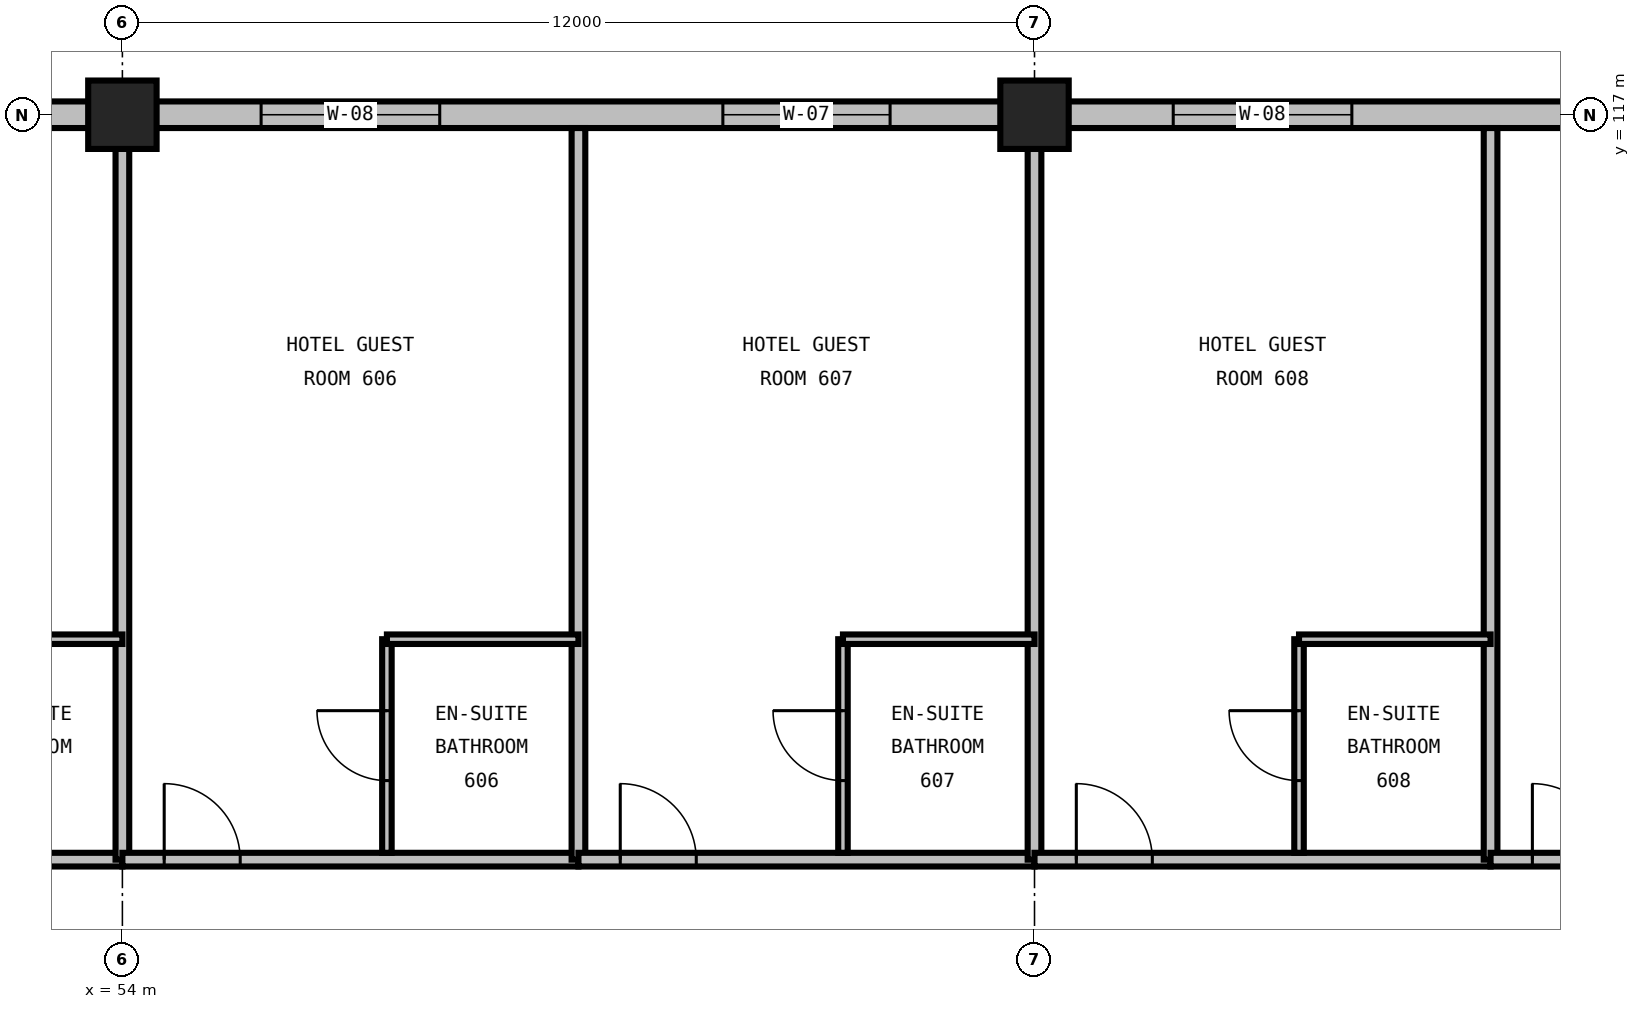
"""IFC4 building model, lengths in metres.
Left out: names, types, materials, properties, quantities, classifications, styles, units other than length and angle.
Written with IfcOpenShell. Run it as: python <this file> out.ifc"""

import sys

from ifc_helpers import new_model, si_unit, direction, frame, frame_2d, origin, origin_2d, place, context, subcontext, project, spatial, rectangle, extrude, element, fill, save


model = new_model("IFC4")
c1 = context("Model", 3, precision=1e-05, world=origin(), true_north=direction((0.0, 1.0)))
c2 = subcontext(c1, "Body", "Model", "MODEL_VIEW")
j1 = project(units=[si_unit("LENGTHUNIT", "METRE"), si_unit("PLANEANGLEUNIT", "RADIAN")], contexts=[c1])
p1 = place(None, origin())
s1 = spatial("IfcSite", under=j1, at=p1, CompositionType="ELEMENT")
p2 = place(p1, origin())
s2 = spatial("IfcBuilding", under=s1, at=p2, CompositionType="ELEMENT")
p3 = place(p2, frame((0.0, 0.0, 31.2)))
s3 = spatial("IfcBuildingStorey", under=s2, at=p3, CompositionType="ELEMENT", Elevation=31.2)
for number, where, z_axis, x_axis in (
    (1, (54.0, 117.0, 0.0), (0.0, 0.0, 1.0), (1.0, 0.0, 0.0)),
    (2, (66.0, 117.0, 0.0), (0.0, 0.0, 1.0), (1.0, 0.0, 0.0)),
):
    element("IfcColumn", number, at=place(p3, frame(where, z_axis=z_axis, x_axis=x_axis)), inside=s3, PredefinedType="COLUMN", context=c2, shape_type="SweptSolid", body=[
        extrude(rectangle(XDim=0.9, YDim=0.9, at=origin_2d()), origin(), (0.0, 0.0, 1.0), 3.6),
    ])
p4 = place(p3, frame((54.0, 117.0, 0.0), z_axis=(0.0, 0.0, 1.0), x_axis=(-1.0, 0.0, 0.0)))
e3 = element("IfcWall", 3, at=p4, inside=s3, PredefinedType="STANDARD", context=c2, shape_type="SweptSolid", body=[
    extrude(rectangle(XDim=12.0, YDim=0.35, at=frame_2d((6.0, 0.0))), origin(), (0.0, 0.0, 1.0), 2.486),
])
p5 = place(p4, frame((1.9, 0.0, 0.75)))
e4 = element("IfcOpeningElement", 4, at=p5, cuts=e3, PredefinedType="OPENING", context=c2, shape_type="SweptSolid", body=[
    extrude(rectangle(XDim=2.2, YDim=1.6, at=frame_2d((1.1, 0.8))), frame((0.0, 0.19, 0.0), z_axis=(0.0, -1.0, 0.0), x_axis=(1.0, 0.0, 0.0)), (0.0, 0.0, 1.0), 0.38),
])
p6 = place(p4, frame((7.825, 0.0, 0.75)))
e5 = element("IfcOpeningElement", 5, at=p6, cuts=e3, PredefinedType="OPENING", context=c2, shape_type="SweptSolid", body=[
    extrude(rectangle(XDim=2.35, YDim=1.6, at=frame_2d((1.175, 0.8))), frame((0.0, 0.19, 0.0), z_axis=(0.0, -1.0, 0.0), x_axis=(1.0, 0.0, 0.0)), (0.0, 0.0, 1.0), 0.38),
])
p7 = place(p3, frame((66.0, 117.0, 0.0), z_axis=(0.0, 0.0, 1.0), x_axis=(-1.0, 0.0, 0.0)))
e6 = element("IfcWall", 6, at=p7, inside=s3, PredefinedType="STANDARD", context=c2, shape_type="SweptSolid", body=[
    extrude(rectangle(XDim=12.0, YDim=0.35, at=frame_2d((6.0, 0.0))), origin(), (0.0, 0.0, 1.0), 2.486),
])
p8 = place(p7, frame((1.9, 0.0, 0.75)))
e7 = element("IfcOpeningElement", 7, at=p8, cuts=e6, PredefinedType="OPENING", context=c2, shape_type="SweptSolid", body=[
    extrude(rectangle(XDim=2.2, YDim=1.6, at=frame_2d((1.1, 0.8))), frame((0.0, 0.19, 0.0), z_axis=(0.0, -1.0, 0.0), x_axis=(1.0, 0.0, 0.0)), (0.0, 0.0, 1.0), 0.38),
])
p9 = place(p7, frame((7.825, 0.0, 0.75)))
e8 = element("IfcOpeningElement", 8, at=p9, cuts=e6, PredefinedType="OPENING", context=c2, shape_type="SweptSolid", body=[
    extrude(rectangle(XDim=2.35, YDim=1.6, at=frame_2d((1.175, 0.8))), frame((0.0, 0.19, 0.0), z_axis=(0.0, -1.0, 0.0), x_axis=(1.0, 0.0, 0.0)), (0.0, 0.0, 1.0), 0.38),
])
p10 = place(p3, frame((78.0, 117.0, 0.0), z_axis=(0.0, 0.0, 1.0), x_axis=(-1.0, 0.0, 0.0)))
e9 = element("IfcWall", 9, at=p10, inside=s3, PredefinedType="STANDARD", context=c2, shape_type="SweptSolid", body=[
    extrude(rectangle(XDim=12.0, YDim=0.35, at=frame_2d((6.0, 0.0))), origin(), (0.0, 0.0, 1.0), 2.486),
])
p11 = place(p10, frame((1.9, 0.0, 0.75)))
e10 = element("IfcOpeningElement", 10, at=p11, cuts=e9, PredefinedType="OPENING", context=c2, shape_type="SweptSolid", body=[
    extrude(rectangle(XDim=2.2, YDim=1.6, at=frame_2d((1.1, 0.8))), frame((0.0, 0.19, 0.0), z_axis=(0.0, -1.0, 0.0), x_axis=(1.0, 0.0, 0.0)), (0.0, 0.0, 1.0), 0.38),
])
p12 = place(p10, frame((7.825, 0.0, 0.75)))
e11 = element("IfcOpeningElement", 11, at=p12, cuts=e9, PredefinedType="OPENING", context=c2, shape_type="SweptSolid", body=[
    extrude(rectangle(XDim=2.35, YDim=1.6, at=frame_2d((1.175, 0.8))), frame((0.0, 0.19, 0.0), z_axis=(0.0, -1.0, 0.0), x_axis=(1.0, 0.0, 0.0)), (0.0, 0.0, 1.0), 0.38),
])
p13 = place(p3, frame((48.0, 107.2, 0.0), z_axis=(0.0, 0.0, 1.0), x_axis=(1.0, 0.0, 0.0)))
e12 = element("IfcWall", 12, at=p13, inside=s3, PredefinedType="PARTITIONING", context=c2, shape_type="SweptSolid", body=[
    extrude(rectangle(XDim=6.0, YDim=0.18, at=frame_2d((3.0, 0.0))), origin(), (0.0, 0.0, 1.0), 3.29),
])
p14 = place(p13, frame((0.55, 0.0, 0.0)))
e13 = element("IfcOpeningElement", 13, at=p14, cuts=e12, PredefinedType="OPENING", context=c2, shape_type="SweptSolid", body=[
    extrude(rectangle(XDim=1.0, YDim=2.15, at=frame_2d((0.5, 1.075))), frame((0.0, 0.105, 0.0), z_axis=(0.0, -1.0, 0.0), x_axis=(1.0, 0.0, 0.0)), (0.0, 0.0, 1.0), 0.21),
])
p15 = place(p3, frame((54.0, 107.2, 0.0), z_axis=(0.0, 0.0, 1.0), x_axis=(0.0, 1.0, 0.0)))
e14 = element("IfcWall", 14, at=p15, inside=s3, PredefinedType="PARTITIONING", context=c2, shape_type="SweptSolid", body=[
    extrude(rectangle(XDim=9.625, YDim=0.18, at=frame_2d((4.812, 0.0))), origin(), (0.0, 0.0, 1.0), 2.59),
])
p16 = place(p3, frame((51.48, 110.1, 0.0), z_axis=(0.0, 0.0, 1.0), x_axis=(1.0, 0.0, 0.0)))
e15 = element("IfcWall", 15, at=p16, inside=s3, PredefinedType="PARTITIONING", context=c2, shape_type="SweptSolid", body=[
    extrude(rectangle(XDim=2.52, YDim=0.125, at=frame_2d((1.26, 0.0))), origin(), (0.0, 0.0, 1.0), 3.29),
])
p17 = place(p3, frame((54.0, 107.2, 0.0), z_axis=(0.0, 0.0, 1.0), x_axis=(1.0, 0.0, 0.0)))
e16 = element("IfcWall", 16, at=p17, inside=s3, PredefinedType="PARTITIONING", context=c2, shape_type="SweptSolid", body=[
    extrude(rectangle(XDim=6.0, YDim=0.18, at=frame_2d((3.0, 0.0))), origin(), (0.0, 0.0, 1.0), 3.29),
])
p18 = place(p17, frame((0.55, 0.0, 0.0)))
e17 = element("IfcOpeningElement", 17, at=p18, cuts=e16, PredefinedType="OPENING", context=c2, shape_type="SweptSolid", body=[
    extrude(rectangle(XDim=1.0, YDim=2.15, at=frame_2d((0.5, 1.075))), frame((0.0, 0.105, 0.0), z_axis=(0.0, -1.0, 0.0), x_axis=(1.0, 0.0, 0.0)), (0.0, 0.0, 1.0), 0.21),
])
p19 = place(p3, frame((60.0, 107.2, 0.0), z_axis=(0.0, 0.0, 1.0), x_axis=(0.0, 1.0, 0.0)))
e18 = element("IfcWall", 18, at=p19, inside=s3, PredefinedType="PARTITIONING", context=c2, shape_type="SweptSolid", body=[
    extrude(rectangle(XDim=9.625, YDim=0.18, at=frame_2d((4.812, 0.0))), origin(), (0.0, 0.0, 1.0), 3.29),
])
p20 = place(p3, frame((57.48, 107.29, 0.0), z_axis=(0.0, 0.0, 1.0), x_axis=(0.0, 1.0, 0.0)))
e19 = element("IfcWall", 19, at=p20, inside=s3, PredefinedType="PARTITIONING", context=c2, shape_type="SweptSolid", body=[
    extrude(rectangle(XDim=2.81, YDim=0.125, at=frame_2d((1.405, 0.0))), origin(), (0.0, 0.0, 1.0), 3.29),
])
p21 = place(p20, frame((0.95, 0.0, 0.0)))
e20 = element("IfcOpeningElement", 20, at=p21, cuts=e19, PredefinedType="OPENING", context=c2, shape_type="SweptSolid", body=[
    extrude(rectangle(XDim=0.92, YDim=2.1, at=frame_2d((0.46, 1.05))), frame((0.0, 0.077, 0.0), z_axis=(0.0, -1.0, 0.0), x_axis=(1.0, 0.0, 0.0)), (0.0, 0.0, 1.0), 0.155),
])
p22 = place(p3, frame((57.48, 110.1, 0.0), z_axis=(0.0, 0.0, 1.0), x_axis=(1.0, 0.0, 0.0)))
e21 = element("IfcWall", 21, at=p22, inside=s3, PredefinedType="PARTITIONING", context=c2, shape_type="SweptSolid", body=[
    extrude(rectangle(XDim=2.52, YDim=0.125, at=frame_2d((1.26, 0.0))), origin(), (0.0, 0.0, 1.0), 3.29),
])
p23 = place(p3, frame((60.0, 107.2, 0.0), z_axis=(0.0, 0.0, 1.0), x_axis=(1.0, 0.0, 0.0)))
e22 = element("IfcWall", 22, at=p23, inside=s3, PredefinedType="PARTITIONING", context=c2, shape_type="SweptSolid", body=[
    extrude(rectangle(XDim=6.0, YDim=0.18, at=frame_2d((3.0, 0.0))), origin(), (0.0, 0.0, 1.0), 3.29),
])
p24 = place(p23, frame((0.55, 0.0, 0.0)))
e23 = element("IfcOpeningElement", 23, at=p24, cuts=e22, PredefinedType="OPENING", context=c2, shape_type="SweptSolid", body=[
    extrude(rectangle(XDim=1.0, YDim=2.15, at=frame_2d((0.5, 1.075))), frame((0.0, 0.105, 0.0), z_axis=(0.0, -1.0, 0.0), x_axis=(1.0, 0.0, 0.0)), (0.0, 0.0, 1.0), 0.21),
])
p25 = place(p3, frame((66.0, 107.2, 0.0), z_axis=(0.0, 0.0, 1.0), x_axis=(0.0, 1.0, 0.0)))
e24 = element("IfcWall", 24, at=p25, inside=s3, PredefinedType="PARTITIONING", context=c2, shape_type="SweptSolid", body=[
    extrude(rectangle(XDim=9.625, YDim=0.18, at=frame_2d((4.812, 0.0))), origin(), (0.0, 0.0, 1.0), 2.59),
])
p26 = place(p3, frame((63.48, 107.29, 0.0), z_axis=(0.0, 0.0, 1.0), x_axis=(0.0, 1.0, 0.0)))
e25 = element("IfcWall", 25, at=p26, inside=s3, PredefinedType="PARTITIONING", context=c2, shape_type="SweptSolid", body=[
    extrude(rectangle(XDim=2.81, YDim=0.125, at=frame_2d((1.405, 0.0))), origin(), (0.0, 0.0, 1.0), 3.29),
])
p27 = place(p26, frame((0.95, 0.0, 0.0)))
e26 = element("IfcOpeningElement", 26, at=p27, cuts=e25, PredefinedType="OPENING", context=c2, shape_type="SweptSolid", body=[
    extrude(rectangle(XDim=0.92, YDim=2.1, at=frame_2d((0.46, 1.05))), frame((0.0, 0.077, 0.0), z_axis=(0.0, -1.0, 0.0), x_axis=(1.0, 0.0, 0.0)), (0.0, 0.0, 1.0), 0.155),
])
p28 = place(p3, frame((63.48, 110.1, 0.0), z_axis=(0.0, 0.0, 1.0), x_axis=(1.0, 0.0, 0.0)))
e27 = element("IfcWall", 27, at=p28, inside=s3, PredefinedType="PARTITIONING", context=c2, shape_type="SweptSolid", body=[
    extrude(rectangle(XDim=2.52, YDim=0.125, at=frame_2d((1.26, 0.0))), origin(), (0.0, 0.0, 1.0), 3.29),
])
p29 = place(p3, frame((66.0, 107.2, 0.0), z_axis=(0.0, 0.0, 1.0), x_axis=(1.0, 0.0, 0.0)))
e28 = element("IfcWall", 28, at=p29, inside=s3, PredefinedType="PARTITIONING", context=c2, shape_type="SweptSolid", body=[
    extrude(rectangle(XDim=6.0, YDim=0.18, at=frame_2d((3.0, 0.0))), origin(), (0.0, 0.0, 1.0), 3.29),
])
p30 = place(p29, frame((0.55, 0.0, 0.0)))
e29 = element("IfcOpeningElement", 29, at=p30, cuts=e28, PredefinedType="OPENING", context=c2, shape_type="SweptSolid", body=[
    extrude(rectangle(XDim=1.0, YDim=2.15, at=frame_2d((0.5, 1.075))), frame((0.0, 0.105, 0.0), z_axis=(0.0, -1.0, 0.0), x_axis=(1.0, 0.0, 0.0)), (0.0, 0.0, 1.0), 0.21),
])
p31 = place(p3, frame((72.0, 107.2, 0.0), z_axis=(0.0, 0.0, 1.0), x_axis=(0.0, 1.0, 0.0)))
e30 = element("IfcWall", 30, at=p31, inside=s3, PredefinedType="PARTITIONING", context=c2, shape_type="SweptSolid", body=[
    extrude(rectangle(XDim=9.625, YDim=0.18, at=frame_2d((4.812, 0.0))), origin(), (0.0, 0.0, 1.0), 3.29),
])
p32 = place(p3, frame((69.48, 107.29, 0.0), z_axis=(0.0, 0.0, 1.0), x_axis=(0.0, 1.0, 0.0)))
e31 = element("IfcWall", 31, at=p32, inside=s3, PredefinedType="PARTITIONING", context=c2, shape_type="SweptSolid", body=[
    extrude(rectangle(XDim=2.81, YDim=0.125, at=frame_2d((1.405, 0.0))), origin(), (0.0, 0.0, 1.0), 3.29),
])
p33 = place(p32, frame((0.95, 0.0, 0.0)))
e32 = element("IfcOpeningElement", 32, at=p33, cuts=e31, PredefinedType="OPENING", context=c2, shape_type="SweptSolid", body=[
    extrude(rectangle(XDim=0.92, YDim=2.1, at=frame_2d((0.46, 1.05))), frame((0.0, 0.077, 0.0), z_axis=(0.0, -1.0, 0.0), x_axis=(1.0, 0.0, 0.0)), (0.0, 0.0, 1.0), 0.155),
])
p34 = place(p3, frame((69.48, 110.1, 0.0), z_axis=(0.0, 0.0, 1.0), x_axis=(1.0, 0.0, 0.0)))
e33 = element("IfcWall", 33, at=p34, inside=s3, PredefinedType="PARTITIONING", context=c2, shape_type="SweptSolid", body=[
    extrude(rectangle(XDim=2.52, YDim=0.125, at=frame_2d((1.26, 0.0))), origin(), (0.0, 0.0, 1.0), 3.29),
])
p35 = place(p3, frame((72.0, 107.2, 0.0), z_axis=(0.0, 0.0, 1.0), x_axis=(1.0, 0.0, 0.0)))
e34 = element("IfcWall", 34, at=p35, inside=s3, PredefinedType="PARTITIONING", context=c2, shape_type="SweptSolid", body=[
    extrude(rectangle(XDim=6.0, YDim=0.18, at=frame_2d((3.0, 0.0))), origin(), (0.0, 0.0, 1.0), 3.29),
])
p36 = place(p35, frame((0.55, 0.0, 0.0)))
e35 = element("IfcOpeningElement", 35, at=p36, cuts=e34, PredefinedType="OPENING", context=c2, shape_type="SweptSolid", body=[
    extrude(rectangle(XDim=1.0, YDim=2.15, at=frame_2d((0.5, 1.075))), frame((0.0, 0.105, 0.0), z_axis=(0.0, -1.0, 0.0), x_axis=(1.0, 0.0, 0.0)), (0.0, 0.0, 1.0), 0.21),
])
p37 = place(p8, origin())
e36 = element("IfcWindow", 36, at=p37, inside=s3, PartitioningType="DOUBLE_PANEL_VERTICAL", PredefinedType="WINDOW", context=c2, shape_type="SweptSolid", body=[
    extrude(rectangle(XDim=2.2, YDim=1.6, at=frame_2d((1.1, 0.8))), frame((0.0, 0.03, 0.0), z_axis=(0.0, -1.0, 0.0), x_axis=(1.0, 0.0, 0.0)), (0.0, 0.0, 1.0), 0.06),
])
fill(e7, e36)
p38 = place(p9, origin())
e37 = element("IfcWindow", 37, at=p38, inside=s3, PartitioningType="DOUBLE_PANEL_VERTICAL", PredefinedType="WINDOW", context=c2, shape_type="SweptSolid", body=[
    extrude(rectangle(XDim=2.35, YDim=1.6, at=frame_2d((1.175, 0.8))), frame((0.0, 0.03, 0.0), z_axis=(0.0, -1.0, 0.0), x_axis=(1.0, 0.0, 0.0)), (0.0, 0.0, 1.0), 0.06),
])
fill(e8, e37)
p39 = place(p12, origin())
e38 = element("IfcWindow", 38, at=p39, inside=s3, PartitioningType="DOUBLE_PANEL_VERTICAL", PredefinedType="WINDOW", context=c2, shape_type="SweptSolid", body=[
    extrude(rectangle(XDim=2.35, YDim=1.6, at=frame_2d((1.175, 0.8))), frame((0.0, 0.03, 0.0), z_axis=(0.0, -1.0, 0.0), x_axis=(1.0, 0.0, 0.0)), (0.0, 0.0, 1.0), 0.06),
])
fill(e11, e38)
p40 = place(p18, origin())
e39 = element("IfcDoor", 39, at=p40, inside=s3, OperationType="SINGLE_SWING_LEFT", PredefinedType="DOOR", context=c2, shape_type="SweptSolid", body=[
    extrude(rectangle(XDim=1.0, YDim=2.15, at=frame_2d((0.5, 1.075))), frame((0.0, 0.025, 0.0), z_axis=(0.0, -1.0, 0.0), x_axis=(1.0, 0.0, 0.0)), (0.0, 0.0, 1.0), 0.05),
])
fill(e17, e39)
p41 = place(p21, origin())
e40 = element("IfcDoor", 40, at=p41, inside=s3, OperationType="SINGLE_SWING_RIGHT", PredefinedType="DOOR", context=c2, shape_type="SweptSolid", body=[
    extrude(rectangle(XDim=0.92, YDim=2.1, at=frame_2d((0.46, 1.05))), frame((0.0, 0.025, 0.0), z_axis=(0.0, -1.0, 0.0), x_axis=(1.0, 0.0, 0.0)), (0.0, 0.0, 1.0), 0.05),
])
fill(e20, e40)
p42 = place(p24, origin())
e41 = element("IfcDoor", 41, at=p42, inside=s3, OperationType="SINGLE_SWING_LEFT", PredefinedType="DOOR", context=c2, shape_type="SweptSolid", body=[
    extrude(rectangle(XDim=1.0, YDim=2.15, at=frame_2d((0.5, 1.075))), frame((0.0, 0.025, 0.0), z_axis=(0.0, -1.0, 0.0), x_axis=(1.0, 0.0, 0.0)), (0.0, 0.0, 1.0), 0.05),
])
fill(e23, e41)
p43 = place(p27, origin())
e42 = element("IfcDoor", 42, at=p43, inside=s3, OperationType="SINGLE_SWING_RIGHT", PredefinedType="DOOR", context=c2, shape_type="SweptSolid", body=[
    extrude(rectangle(XDim=0.92, YDim=2.1, at=frame_2d((0.46, 1.05))), frame((0.0, 0.025, 0.0), z_axis=(0.0, -1.0, 0.0), x_axis=(1.0, 0.0, 0.0)), (0.0, 0.0, 1.0), 0.05),
])
fill(e26, e42)
p44 = place(p30, origin())
e43 = element("IfcDoor", 43, at=p44, inside=s3, OperationType="SINGLE_SWING_LEFT", PredefinedType="DOOR", context=c2, shape_type="SweptSolid", body=[
    extrude(rectangle(XDim=1.0, YDim=2.15, at=frame_2d((0.5, 1.075))), frame((0.0, 0.025, 0.0), z_axis=(0.0, -1.0, 0.0), x_axis=(1.0, 0.0, 0.0)), (0.0, 0.0, 1.0), 0.05),
])
fill(e29, e43)
p45 = place(p33, origin())
e44 = element("IfcDoor", 44, at=p45, inside=s3, OperationType="SINGLE_SWING_RIGHT", PredefinedType="DOOR", context=c2, shape_type="SweptSolid", body=[
    extrude(rectangle(XDim=0.92, YDim=2.1, at=frame_2d((0.46, 1.05))), frame((0.0, 0.025, 0.0), z_axis=(0.0, -1.0, 0.0), x_axis=(1.0, 0.0, 0.0)), (0.0, 0.0, 1.0), 0.05),
])
fill(e32, e44)
p46 = place(p36, origin())
e45 = element("IfcDoor", 45, at=p46, inside=s3, OperationType="SINGLE_SWING_LEFT", PredefinedType="DOOR", context=c2, shape_type="SweptSolid", body=[
    extrude(rectangle(XDim=1.0, YDim=2.15, at=frame_2d((0.5, 1.075))), frame((0.0, 0.025, 0.0), z_axis=(0.0, -1.0, 0.0), x_axis=(1.0, 0.0, 0.0)), (0.0, 0.0, 1.0), 0.05),
])
fill(e35, e45)
save(model, sys.argv[1])
